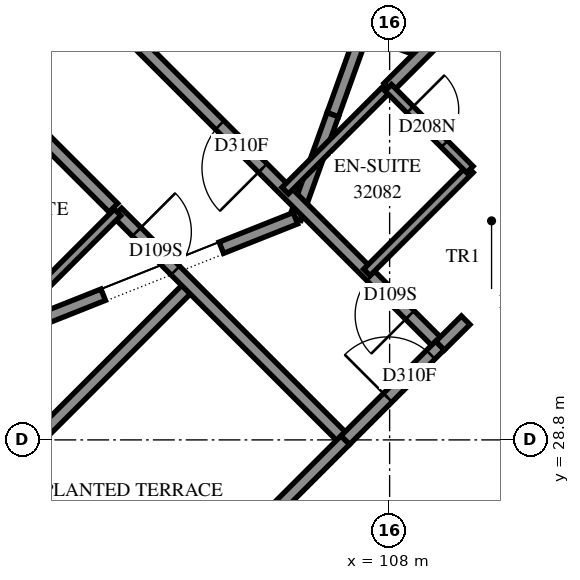
"""IFC4 building model, lengths in metres.
Left out: names, types, materials, properties, quantities, classifications, styles, units other than length and angle.
Written with IfcOpenShell. Run it as: python <this file> out.ifc"""

import sys

from ifc_helpers import new_model, si_unit, direction, frame, frame_2d, origin, place, context, subcontext, project, spatial, polyline, rectangle, outline, extrude, element, fill, save


model = new_model("IFC4")
c1 = context("Model", 3, precision=1e-05, world=origin(), true_north=direction((0.0, 1.0)))
c2 = subcontext(c1, "Body", "Model", "MODEL_VIEW")
j1 = project(units=[si_unit("LENGTHUNIT", "METRE"), si_unit("PLANEANGLEUNIT", "RADIAN")], contexts=[c1])
p1 = place(None, origin())
s1 = spatial("IfcSite", under=j1, at=p1, CompositionType="ELEMENT")
p2 = place(p1, origin())
s2 = spatial("IfcBuilding", under=s1, at=p2, CompositionType="ELEMENT")
p3 = place(p2, frame((0.0, 0.0, 118.6)))
s3 = spatial("IfcBuildingStorey", under=s2, at=p3, CompositionType="ELEMENT", Elevation=118.6)
p4 = place(p3, frame((105.848, 25.815, 0.0), z_axis=(0.0, 0.0, 1.0), x_axis=(0.9291504333, 0.3697018694, 0.0)))
e1 = element("IfcWall", 1, at=p4, inside=s3, PredefinedType="SOLIDWALL", context=c2, shape_type="SweptSolid", body=[
    extrude(outline(polyline([(0.118, -0.275), (5.68, -0.275), (5.432, 0.275), (-0.118, 0.275), (0.118, -0.275)])), origin(), (0.0, 0.0, 1.0), 3.1),
])
p5 = place(p4, frame((0.358, 0.0, 0.7)))
e2 = element("IfcOpeningElement", 2, at=p5, cuts=e1, PredefinedType="OPENING", context=c2, shape_type="SweptSolid", body=[
    extrude(rectangle(XDim=1.8, YDim=2.0, at=frame_2d((0.9, 1.0))), frame((0.0, 0.285, 0.0), z_axis=(0.0, -1.0, 0.0), x_axis=(1.0, 0.0, 0.0)), (0.0, 0.0, 1.0), 0.57),
])
p6 = place(p4, frame((2.874, 0.0, 0.7)))
e3 = element("IfcOpeningElement", 3, at=p6, cuts=e1, PredefinedType="OPENING", context=c2, shape_type="SweptSolid", body=[
    extrude(rectangle(XDim=1.8, YDim=2.0, at=frame_2d((0.9, 1.0))), frame((0.0, 0.285, 0.0), z_axis=(0.0, -1.0, 0.0), x_axis=(1.0, 0.0, 0.0)), (0.0, 0.0, 1.0), 0.57),
])
p7 = place(p3, frame((112.823, 32.897, 0.0), z_axis=(0.0, 0.0, 1.0), x_axis=(-0.7071067812, 0.7071067812, 0.0)))
e4 = element("IfcWall", 4, at=p7, inside=s3, PredefinedType="SOLIDWALL", context=c2, shape_type="SweptSolid", body=[
    extrude(outline(polyline([(-0.175, -0.275), (4.625, -0.275), (5.175, 0.275), (0.175, 0.275), (-0.175, -0.275)])), origin(), (0.0, 0.0, 1.0), 3.1),
])
p8 = place(p7, frame((1.963, 0.0, 0.7)))
e5 = element("IfcOpeningElement", 5, at=p8, cuts=e4, PredefinedType="OPENING", context=c2, shape_type="SweptSolid", body=[
    extrude(rectangle(XDim=1.8, YDim=1.8, at=frame_2d((0.9, 0.9))), frame((0.0, 0.285, 0.0), z_axis=(0.0, -1.0, 0.0), x_axis=(1.0, 0.0, 0.0)), (0.0, 0.0, 1.0), 0.57),
])
p9 = place(p3, frame((108.512, 38.162, 0.0), z_axis=(0.0, 0.0, 1.0), x_axis=(-0.3392396531, -0.9406999829, 0.0)))
e6 = element("IfcWall", 6, at=p9, inside=s3, PredefinedType="PARAPET", context=c2, shape_type="SweptSolid", body=[
    extrude(outline(polyline([(0.064, -0.1), (4.268, -0.1), (4.268, 0.1), (-0.064, 0.1), (0.064, -0.1)])), origin(), (0.0, 0.0, 1.0), 0.25),
])
p10 = place(p3, frame((107.065, 34.147, 0.0), z_axis=(0.0, 0.0, 1.0), x_axis=(-0.3392614778, -0.940692112, 0.0)))
e7 = element("IfcWall", 7, at=p10, inside=s3, PredefinedType="PARAPET", context=c2, shape_type="SweptSolid", body=[
    extrude(outline(polyline([(0.0, -0.1), (1.764, -0.1), (1.855, 0.1), (0.0, 0.1), (0.0, -0.1)])), origin(), (0.0, 0.0, 1.0), 0.25),
])
p11 = place(p3, frame((96.465, 23.082, 0.0), z_axis=(0.0, 0.0, 1.0), x_axis=(0.707016895, 0.7071966559, 0.0)))
e8 = element("IfcWall", 8, at=p11, inside=s3, PredefinedType="PARTITIONING", context=c2, shape_type="SweptSolid", body=[
    extrude(rectangle(XDim=11.682, YDim=0.2, at=frame_2d((5.841, 0.0))), origin(), (0.0, 0.0, 1.0), 3.1),
])
p12 = place(p3, frame((108.831, 30.355, 0.0), z_axis=(0.0, 0.0, 1.0), x_axis=(-0.7073012053, 0.7069123036, 0.0)))
e9 = element("IfcWall", 9, at=p12, inside=s3, PredefinedType="PARTITIONING", context=c2, shape_type="SweptSolid", body=[
    extrude(rectangle(XDim=7.2, YDim=0.2, at=frame_2d((3.6, 0.0))), origin(), (0.0, 0.0, 1.0), 3.1),
])
p13 = place(p12, frame((4.125, 0.0, 0.0)))
e10 = element("IfcOpeningElement", 10, at=p13, cuts=e9, PredefinedType="OPENING", context=c2, shape_type="SweptSolid", body=[
    extrude(rectangle(XDim=1.0, YDim=2.1, at=frame_2d((0.5, 1.05))), frame((0.0, 0.11, 0.0), z_axis=(0.0, -1.0, 0.0), x_axis=(1.0, 0.0, 0.0)), (0.0, 0.0, 1.0), 0.22),
])
p14 = place(p12, frame((0.705, 0.0, 0.0)))
e11 = element("IfcOpeningElement", 11, at=p14, cuts=e9, PredefinedType="OPENING", context=c2, shape_type="SweptSolid", body=[
    extrude(rectangle(XDim=0.9, YDim=2.1, at=frame_2d((0.45, 1.05))), frame((0.0, 0.11, 0.0), z_axis=(0.0, -1.0, 0.0), x_axis=(1.0, 0.0, 0.0)), (0.0, 0.0, 1.0), 0.22),
])
p15 = place(p3, frame((103.521, 32.541, 0.0), z_axis=(0.0, 0.0, 1.0), x_axis=(0.7071067812, -0.7071067812, 0.0)))
e12 = element("IfcWall", 12, at=p15, inside=s3, PredefinedType="PARTITIONING", context=c2, shape_type="SweptSolid", body=[
    extrude(rectangle(XDim=5.301, YDim=0.2, at=frame_2d((2.65, 0.0))), origin(), (0.0, 0.0, 1.0), 3.1),
])
p16 = place(p15, frame((0.451, 0.0, 0.0)))
e13 = element("IfcOpeningElement", 13, at=p16, cuts=e12, PredefinedType="OPENING", context=c2, shape_type="SweptSolid", body=[
    extrude(rectangle(XDim=0.9, YDim=2.1, at=frame_2d((0.45, 1.05))), frame((0.0, 0.11, 0.0), z_axis=(0.0, -1.0, 0.0), x_axis=(1.0, 0.0, 0.0)), (0.0, 0.0, 1.0), 0.22),
])
p17 = place(p3, frame((105.155, 26.681, 0.0), z_axis=(0.0, 0.0, 1.0), x_axis=(0.7071067812, 0.7071067812, 0.0)))
e14 = element("IfcWall", 14, at=p17, inside=s3, PredefinedType="PARTITIONING", context=c2, shape_type="SweptSolid", body=[
    extrude(rectangle(XDim=2.993, YDim=0.2, at=frame_2d((1.496, 0.0))), origin(), (0.0, 0.0, 1.0), 3.1),
])
p18 = place(p3, frame((101.83, 30.844, 0.0), z_axis=(0.0, 0.0, 1.0), x_axis=(0.706689978, 0.7075233388, 0.0)))
e15 = element("IfcWall", 15, at=p18, inside=s3, PredefinedType="PARTITIONING", context=c2, shape_type="SweptSolid", body=[
    extrude(rectangle(XDim=2.4, YDim=0.15, at=frame_2d((1.2, 0.0))), origin(), (0.0, 0.0, 1.0), 3.1),
])
for number, where, z_axis, x_axis in (
    (16, (106.283, 32.899, 0.0), (0.0, 0.0, 1.0), (0.707, 0.707, 0.0)),
    (17, (107.625, 31.555, 0.0), (0.0, 0.0, 1.0), (0.707, 0.707, 0.0)),
):
    element("IfcWall", number, at=place(p3, frame(where, z_axis=z_axis, x_axis=x_axis)), inside=s3, PredefinedType="PARTITIONING", context=c2, shape_type="SweptSolid", body=[
        extrude(rectangle(XDim=2.398, YDim=0.15, at=frame_2d((1.199, 0.0))), origin(), (0.0, 0.0, 1.0), 3.1),
    ])
p19 = place(p3, frame((107.271, 28.797, 0.0), z_axis=(0.0, 0.0, 1.0), x_axis=(0.7071067812, 0.7071067812, 0.0)))
e18 = element("IfcWall", 18, at=p19, inside=s3, PredefinedType="PARTITIONING", context=c2, shape_type="SweptSolid", body=[
    extrude(rectangle(XDim=2.2, YDim=0.2, at=frame_2d((1.1, 0.0))), origin(), (0.0, 0.0, 1.0), 3.1),
])
p20 = place(p19, frame((0.987, 0.0, 0.0)))
e19 = element("IfcOpeningElement", 19, at=p20, cuts=e18, PredefinedType="OPENING", context=c2, shape_type="SweptSolid", body=[
    extrude(rectangle(XDim=1.0, YDim=2.1, at=frame_2d((0.5, 1.05))), frame((0.0, 0.11, 0.0), z_axis=(0.0, -1.0, 0.0), x_axis=(1.0, 0.0, 0.0)), (0.0, 0.0, 1.0), 0.22),
])
p21 = place(p3, frame((107.979, 34.595, 0.0), z_axis=(0.0, 0.0, 1.0), x_axis=(0.7071067812, 0.7071067812, 0.0)))
e20 = element("IfcWall", 20, at=p21, inside=s3, PredefinedType="PARTITIONING", context=c2, shape_type="SweptSolid", body=[
    extrude(rectangle(XDim=1.95, YDim=0.2, at=frame_2d((0.975, 0.0))), origin(), (0.0, 0.0, 1.0), 3.1),
])
p22 = place(p3, frame((107.977, 34.591, 0.0), z_axis=(0.0, 0.0, 1.0), x_axis=(0.7065800724, -0.7076330979, 0.0)))
e21 = element("IfcWall", 21, at=p22, inside=s3, PredefinedType="PARTITIONING", context=c2, shape_type="SweptSolid", body=[
    extrude(rectangle(XDim=1.899, YDim=0.15, at=frame_2d((0.95, 0.0))), origin(), (0.0, 0.0, 1.0), 3.1),
])
p23 = place(p22, frame((0.508, 0.0, 0.0)))
e22 = element("IfcOpeningElement", 22, at=p23, cuts=e21, PredefinedType="OPENING", context=c2, shape_type="SweptSolid", body=[
    extrude(rectangle(XDim=0.8, YDim=2.1, at=frame_2d((0.4, 1.05))), frame((0.0, 0.085, 0.0), z_axis=(0.0, -1.0, 0.0), x_axis=(1.0, 0.0, 0.0)), (0.0, 0.0, 1.0), 0.17),
])
p24 = place(p3, frame((102.183, 33.889, 0.0), z_axis=(0.0, 0.0, 1.0), x_axis=(0.7076620277, -0.7065510983, 0.0)))
e23 = element("IfcWall", 23, at=p24, inside=s3, PredefinedType="PARTITIONING", context=c2, shape_type="SweptSolid", body=[
    extrude(rectangle(XDim=1.8, YDim=0.2, at=frame_2d((0.9, 0.0))), origin(), (0.0, 0.0, 1.0), 3.1),
])
p25 = place(p3, frame((108.831, 30.349, 0.0), z_axis=(0.0, 0.0, 1.0), x_axis=(0.7087923682, 0.7054171665, 0.0)))
e24 = element("IfcWall", 24, at=p25, inside=s3, PredefinedType="PARTITIONING", context=c2, shape_type="SweptSolid", body=[
    extrude(rectangle(XDim=0.593, YDim=0.2, at=frame_2d((0.296, 0.0))), origin(), (0.0, 0.0, 1.0), 3.1),
])
p26 = place(p3, frame((106.451, 32.445, 0.0), z_axis=(0.0, 0.0, 1.0), x_axis=(-0.9291537049, -0.369693647, 0.0)))
e25 = element("IfcWall", 25, at=p26, inside=s3, PredefinedType="PARAPET", context=c2, shape_type="SweptSolid", body=[
    extrude(outline(polyline([(0.045, -0.1), (1.311, -0.1), (1.311, 0.1), (-0.045, 0.1), (0.045, -0.1)])), origin(), (0.0, 0.0, 1.0), 0.25),
])
p27 = place(p3, frame((103.29, 31.188, 0.0), z_axis=(0.0, 0.0, 1.0), x_axis=(-0.9291561184, -0.3696875811, 0.0)))
e26 = element("IfcWall", 26, at=p27, inside=s3, PredefinedType="PARAPET", context=c2, shape_type="SweptSolid", body=[
    extrude(outline(polyline([(0.0, -0.1), (2.21, -0.1), (2.124, 0.1), (0.0, 0.1), (0.0, -0.1)])), origin(), (0.0, 0.0, 1.0), 0.25),
])
p28 = place(p3, frame((108.771, 37.257, 0.0), z_axis=(0.0, 0.0, 1.0), x_axis=(-0.3392436018, -0.9406985589, 0.0)))
e27 = element("IfcWall", 27, at=p28, inside=s3, PredefinedType="SOLIDWALL", context=c2, shape_type="SweptSolid", body=[
    extrude(outline(polyline([(0.0, -0.3), (2.121, -0.3), (2.121, 0.3), (0.0, 0.3), (0.0, -0.3)])), origin(), (0.0, 0.0, 1.0), 0.65),
])
p29 = place(p13, origin())
e28 = element("IfcDoor", 28, at=p29, inside=s3, OperationType="SINGLE_SWING_LEFT", PredefinedType="DOOR", context=c2, shape_type="SweptSolid", body=[
    extrude(rectangle(XDim=1.0, YDim=2.1, at=frame_2d((0.5, 1.05))), frame((0.0, 0.025, 0.0), z_axis=(0.0, -1.0, 0.0), x_axis=(1.0, 0.0, 0.0)), (0.0, 0.0, 1.0), 0.05),
])
fill(e10, e28)
p30 = place(p16, origin())
e29 = element("IfcDoor", 29, at=p30, inside=s3, OperationType="SINGLE_SWING_RIGHT", PredefinedType="DOOR", context=c2, shape_type="SweptSolid", body=[
    extrude(rectangle(XDim=0.9, YDim=2.1, at=frame_2d((0.45, 1.05))), frame((0.0, 0.025, 0.0), z_axis=(0.0, -1.0, 0.0), x_axis=(1.0, 0.0, 0.0)), (0.0, 0.0, 1.0), 0.05),
])
fill(e13, e29)
p31 = place(p14, origin())
e30 = element("IfcDoor", 30, at=p31, inside=s3, OperationType="SINGLE_SWING_RIGHT", PredefinedType="DOOR", context=c2, shape_type="SweptSolid", body=[
    extrude(rectangle(XDim=0.9, YDim=2.1, at=frame_2d((0.45, 1.05))), frame((0.0, 0.025, 0.0), z_axis=(0.0, -1.0, 0.0), x_axis=(1.0, 0.0, 0.0)), (0.0, 0.0, 1.0), 0.05),
])
fill(e11, e30)
p32 = place(p23, origin())
e31 = element("IfcDoor", 31, at=p32, inside=s3, OperationType="SINGLE_SWING_RIGHT", PredefinedType="DOOR", context=c2, shape_type="SweptSolid", body=[
    extrude(rectangle(XDim=0.8, YDim=2.1, at=frame_2d((0.4, 1.05))), frame((0.0, 0.025, 0.0), z_axis=(0.0, -1.0, 0.0), x_axis=(1.0, 0.0, 0.0)), (0.0, 0.0, 1.0), 0.05),
])
fill(e22, e31)
p33 = place(p20, origin())
e32 = element("IfcDoor", 32, at=p33, inside=s3, OperationType="SINGLE_SWING_RIGHT", PredefinedType="DOOR", context=c2, shape_type="SweptSolid", body=[
    extrude(rectangle(XDim=1.0, YDim=2.1, at=frame_2d((0.5, 1.05))), frame((0.0, 0.025, 0.0), z_axis=(0.0, -1.0, 0.0), x_axis=(1.0, 0.0, 0.0)), (0.0, 0.0, 1.0), 0.05),
])
fill(e19, e32)
save(model, sys.argv[1])
